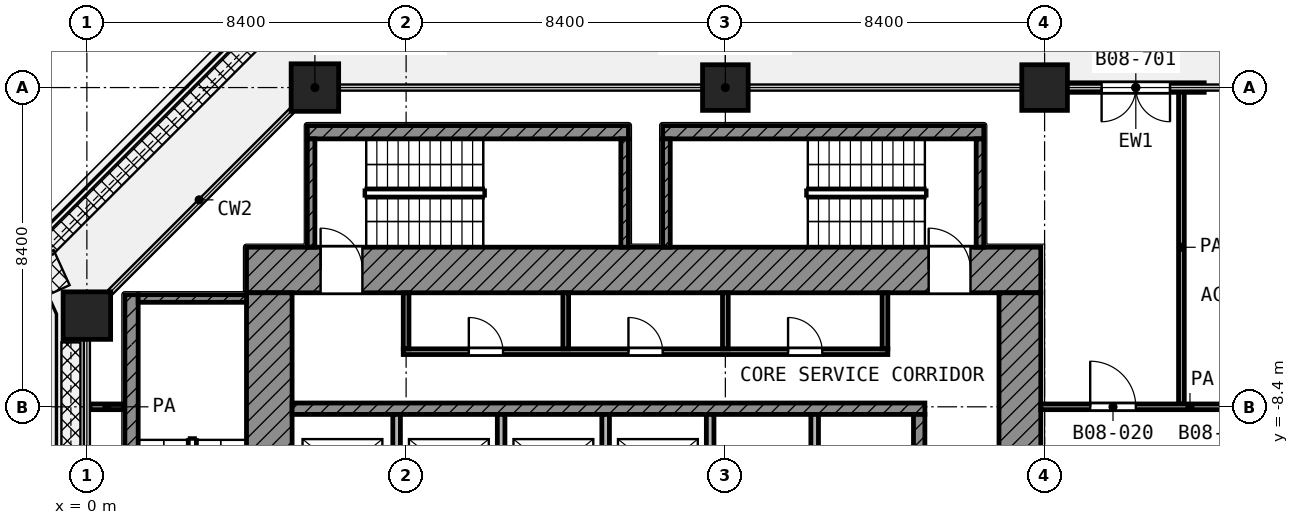
"""IFC4 building model, lengths in metres.
Left out: names, types, materials, properties, quantities, classifications, styles, units other than length and angle.
Written with IfcOpenShell. Run it as: python <this file> out.ifc"""

import sys

from ifc_helpers import new_model, si_unit, direction, frame, frame_2d, origin, origin_2d, place, context, subcontext, project, spatial, rectangle, extrude, element, fill, save


model = new_model("IFC4")
c1 = context("Model", 3, precision=1e-05, world=origin(), true_north=direction((0.0, 1.0)))
c2 = subcontext(c1, "Body", "Model", "MODEL_VIEW")
j1 = project(units=[si_unit("LENGTHUNIT", "METRE"), si_unit("PLANEANGLEUNIT", "RADIAN")], contexts=[c1])
p1 = place(None, origin())
s1 = spatial("IfcSite", under=j1, at=p1, CompositionType="ELEMENT")
p2 = place(p1, origin())
s2 = spatial("IfcBuilding", under=s1, at=p2, CompositionType="ELEMENT")
p3 = place(p2, frame((0.0, 0.0, 39.2)))
s3 = spatial("IfcBuildingStorey", under=s2, at=p3, CompositionType="ELEMENT", Elevation=39.2)
p4 = place(p3, frame((6.0, 0.0, 0.0), z_axis=(0.0, 0.0, 1.0), x_axis=(1.0, 0.0, 0.0)))
e1 = element("IfcColumn", 1, at=p4, inside=s3, PredefinedType="COLUMN", context=c2, shape_type="SweptSolid", body=[
    extrude(rectangle(XDim=1.25, YDim=1.25, at=origin_2d()), origin(), (0.0, 0.0, 1.0), 4.2),
])
for number, where, z_axis, x_axis in (
    (2, (16.8, 0.0, 0.0), (0.0, 0.0, 1.0), (1.0, 0.0, 0.0)),
    (3, (25.2, 0.0, 0.0), (0.0, 0.0, 1.0), (1.0, 0.0, 0.0)),
):
    element("IfcColumn", number, at=place(p3, frame(where, z_axis=z_axis, x_axis=x_axis)), inside=s3, PredefinedType="COLUMN", context=c2, shape_type="SweptSolid", body=[
        extrude(rectangle(XDim=1.2, YDim=1.2, at=origin_2d()), origin(), (0.0, 0.0, 1.0), 4.2),
    ])
p5 = place(p3, frame((0.0, -6.0, 0.0), z_axis=(0.0, 0.0, 1.0), x_axis=(1.0, 0.0, 0.0)))
e4 = element("IfcColumn", 4, at=p5, inside=s3, PredefinedType="COLUMN", context=c2, shape_type="SweptSolid", body=[
    extrude(rectangle(XDim=1.25, YDim=1.25, at=origin_2d()), origin(), (0.0, 0.0, 1.0), 4.2),
])
p6 = place(p3, frame((29.4, 0.0, 0.0), z_axis=(0.0, 0.0, 1.0), x_axis=(-1.0, 0.0, 0.0)))
e5 = element("IfcWall", 5, at=p6, inside=s3, PredefinedType="SOLIDWALL", context=c2, shape_type="SweptSolid", body=[
    extrude(rectangle(XDim=3.6, YDim=0.25, at=frame_2d((1.8, 0.0))), origin(), (0.0, 0.0, 1.0), 3.78),
])
p7 = place(p6, frame((0.9, 0.0, 0.0)))
e6 = element("IfcOpeningElement", 6, at=p7, cuts=e5, PredefinedType="OPENING", context=c2, shape_type="SweptSolid", body=[
    extrude(rectangle(XDim=1.8, YDim=2.1, at=frame_2d((0.9, 1.05))), frame((0.0, 0.135, 0.0), z_axis=(0.0, -1.0, 0.0), x_axis=(1.0, 0.0, 0.0)), (0.0, 0.0, 1.0), 0.27),
])
p8 = place(p3, frame((4.2, -4.8, 0.0), z_axis=(0.0, 0.0, 1.0), x_axis=(1.0, 0.0, 0.0)))
e7 = element("IfcWall", 7, at=p8, inside=s3, PredefinedType="SHEAR", context=c2, shape_type="SweptSolid", body=[
    extrude(rectangle(XDim=20.9, YDim=1.2, at=frame_2d((10.45, 0.0))), origin(), (0.0, 0.0, 1.0), 3.9),
])
p9 = place(p8, frame((1.95, 0.0, 0.0)))
e8 = element("IfcOpeningElement", 8, at=p9, cuts=e7, PredefinedType="OPENING", context=c2, shape_type="SweptSolid", body=[
    extrude(rectangle(XDim=1.1, YDim=2.1, at=frame_2d((0.55, 1.05))), frame((0.0, 0.61, 0.0), z_axis=(0.0, -1.0, 0.0), x_axis=(1.0, 0.0, 0.0)), (0.0, 0.0, 1.0), 1.22),
])
p10 = place(p8, frame((17.95, 0.0, 0.0)))
e9 = element("IfcOpeningElement", 9, at=p10, cuts=e7, PredefinedType="OPENING", context=c2, shape_type="SweptSolid", body=[
    extrude(rectangle(XDim=1.1, YDim=2.1, at=frame_2d((0.55, 1.05))), frame((0.0, 0.61, 0.0), z_axis=(0.0, -1.0, 0.0), x_axis=(1.0, 0.0, 0.0)), (0.0, 0.0, 1.0), 1.22),
])
p11 = place(p3, frame((4.8, -25.1, 0.0), z_axis=(0.0, 0.0, 1.0), x_axis=(0.0, 1.0, 0.0)))
e10 = element("IfcWall", 10, at=p11, inside=s3, PredefinedType="SHEAR", context=c2, shape_type="SweptSolid", body=[
    extrude(rectangle(XDim=19.7, YDim=1.2, at=frame_2d((9.85, 0.0))), origin(), (0.0, 0.0, 1.0), 3.9),
])
p12 = place(p11, frame((11.55, 0.0, 0.0)))
e11 = element("IfcOpeningElement", 11, at=p12, cuts=e10, PredefinedType="OPENING", context=c2, shape_type="SweptSolid", body=[
    extrude(rectangle(XDim=1.1, YDim=2.1, at=frame_2d((0.55, 1.05))), frame((0.0, 0.61, 0.0), z_axis=(0.0, -1.0, 0.0), x_axis=(1.0, 0.0, 0.0)), (0.0, 0.0, 1.0), 1.22),
])
p13 = place(p11, frame((2.25, 0.0, 0.0)))
e12 = element("IfcOpeningElement", 12, at=p13, cuts=e10, PredefinedType="OPENING", context=c2, shape_type="SweptSolid", body=[
    extrude(rectangle(XDim=1.1, YDim=2.1, at=frame_2d((0.55, 1.05))), frame((0.0, 0.61, 0.0), z_axis=(0.0, -1.0, 0.0), x_axis=(1.0, 0.0, 0.0)), (0.0, 0.0, 1.0), 1.22),
])
p14 = place(p3, frame((24.55, -24.0, 0.0), z_axis=(0.0, 0.0, 1.0), x_axis=(0.0, 1.0, 0.0)))
e13 = element("IfcWall", 13, at=p14, inside=s3, PredefinedType="SHEAR", context=c2, shape_type="SweptSolid", body=[
    extrude(rectangle(XDim=18.6, YDim=1.1, at=frame_2d((9.3, 0.0))), origin(), (0.0, 0.0, 1.0), 3.9),
])
p15 = place(p14, frame((10.5, 0.0, 0.0)))
e14 = element("IfcOpeningElement", 14, at=p15, cuts=e13, PredefinedType="OPENING", context=c2, shape_type="SweptSolid", body=[
    extrude(rectangle(XDim=1.8, YDim=2.1, at=frame_2d((0.9, 1.05))), frame((0.0, 0.56, 0.0), z_axis=(0.0, -1.0, 0.0), x_axis=(1.0, 0.0, 0.0)), (0.0, 0.0, 1.0), 1.12),
])
p16 = place(p3, frame((5.4, -8.45, 0.0), z_axis=(0.0, 0.0, 1.0), x_axis=(1.0, 0.0, 0.0)))
e15 = element("IfcWall", 15, at=p16, inside=s3, PredefinedType="SHEAR", context=c2, shape_type="SweptSolid", body=[
    extrude(rectangle(XDim=16.65, YDim=0.3, at=frame_2d((8.325, 0.0))), origin(), (0.0, 0.0, 1.0), 3.9),
])
p17 = place(p3, frame((21.9, -10.95, 0.0), z_axis=(0.0, 0.0, 1.0), x_axis=(0.0, 1.0, 0.0)))
e16 = element("IfcWall", 16, at=p17, inside=s3, PredefinedType="SHEAR", context=c2, shape_type="SweptSolid", body=[
    extrude(rectangle(XDim=2.35, YDim=0.3, at=frame_2d((1.175, 0.0))), origin(), (0.0, 0.0, 1.0), 3.9),
])
for number, where, z_axis, x_axis in (
    (17, (8.15, -10.95, 0.0), (0.0, 0.0, 1.0), (0.0, 1.0, 0.0)),
    (18, (10.9, -10.95, 0.0), (0.0, 0.0, 1.0), (0.0, 1.0, 0.0)),
    (19, (13.65, -10.95, 0.0), (0.0, 0.0, 1.0), (0.0, 1.0, 0.0)),
    (20, (16.4, -10.95, 0.0), (0.0, 0.0, 1.0), (0.0, 1.0, 0.0)),
    (21, (19.15, -10.95, 0.0), (0.0, 0.0, 1.0), (0.0, 1.0, 0.0)),
):
    element("IfcWall", number, at=place(p3, frame(where, z_axis=z_axis, x_axis=x_axis)), inside=s3, PredefinedType="PARTITIONING", context=c2, shape_type="SweptSolid", body=[
        extrude(rectangle(XDim=2.35, YDim=0.2, at=frame_2d((1.175, 0.0))), origin(), (0.0, 0.0, 1.0), 3.9),
    ])
p18 = place(p3, frame((8.325, -6.95, 0.0), z_axis=(0.0, 0.0, 1.0), x_axis=(1.0, 0.0, 0.0)))
e22 = element("IfcWall", 22, at=p18, inside=s3, PredefinedType="PARTITIONING", context=c2, shape_type="SweptSolid", body=[
    extrude(rectangle(XDim=12.75, YDim=0.15, at=frame_2d((6.375, 0.0))), origin(), (0.0, 0.0, 1.0), 3.9),
])
p19 = place(p18, frame((1.725, 0.0, 0.0)))
e23 = element("IfcOpeningElement", 23, at=p19, cuts=e22, PredefinedType="OPENING", context=c2, shape_type="SweptSolid", body=[
    extrude(rectangle(XDim=0.9, YDim=2.1, at=frame_2d((0.45, 1.05))), frame((0.0, 0.085, 0.0), z_axis=(0.0, -1.0, 0.0), x_axis=(1.0, 0.0, 0.0)), (0.0, 0.0, 1.0), 0.17),
])
p20 = place(p18, frame((5.925, 0.0, 0.0)))
e24 = element("IfcOpeningElement", 24, at=p20, cuts=e22, PredefinedType="OPENING", context=c2, shape_type="SweptSolid", body=[
    extrude(rectangle(XDim=0.9, YDim=2.1, at=frame_2d((0.45, 1.05))), frame((0.0, 0.085, 0.0), z_axis=(0.0, -1.0, 0.0), x_axis=(1.0, 0.0, 0.0)), (0.0, 0.0, 1.0), 0.17),
])
p21 = place(p18, frame((10.125, 0.0, 0.0)))
e25 = element("IfcOpeningElement", 25, at=p21, cuts=e22, PredefinedType="OPENING", context=c2, shape_type="SweptSolid", body=[
    extrude(rectangle(XDim=0.9, YDim=2.1, at=frame_2d((0.45, 1.05))), frame((0.0, 0.085, 0.0), z_axis=(0.0, -1.0, 0.0), x_axis=(1.0, 0.0, 0.0)), (0.0, 0.0, 1.0), 0.17),
])
for number, where, z_axis, x_axis in (
    (26, (8.4, -6.875, 0.0), (0.0, 0.0, 1.0), (0.0, 1.0, 0.0)),
    (27, (12.6, -6.875, 0.0), (0.0, 0.0, 1.0), (0.0, 1.0, 0.0)),
    (28, (16.8, -6.875, 0.0), (0.0, 0.0, 1.0), (0.0, 1.0, 0.0)),
    (29, (21.0, -6.875, 0.0), (0.0, 0.0, 1.0), (0.0, 1.0, 0.0)),
):
    element("IfcWall", number, at=place(p3, frame(where, z_axis=z_axis, x_axis=x_axis)), inside=s3, PredefinedType="PARTITIONING", context=c2, shape_type="SweptSolid", body=[
        extrude(rectangle(XDim=1.475, YDim=0.15, at=frame_2d((0.738, 0.0))), origin(), (0.0, 0.0, 1.0), 3.9),
    ])
p22 = place(p3, frame((1.175, -13.9, 0.0), z_axis=(0.0, 0.0, 1.0), x_axis=(0.0, 1.0, 0.0)))
e30 = element("IfcWall", 30, at=p22, inside=s3, PredefinedType="SHEAR", context=c2, shape_type="SweptSolid", body=[
    extrude(rectangle(XDim=8.45, YDim=0.35, at=frame_2d((4.225, 0.0))), origin(), (0.0, 0.0, 1.0), 3.9),
])
p23 = place(p3, frame((1.35, -5.55, 0.0), z_axis=(0.0, 0.0, 1.0), x_axis=(1.0, 0.0, 0.0)))
e31 = element("IfcWall", 31, at=p23, inside=s3, PredefinedType="SHEAR", context=c2, shape_type="SweptSolid", body=[
    extrude(rectangle(XDim=2.85, YDim=0.2, at=frame_2d((1.425, 0.0))), origin(), (0.0, 0.0, 1.0), 3.9),
])
p24 = place(p3, frame((5.8, -1.175, 0.0), z_axis=(0.0, 0.0, 1.0), x_axis=(1.0, 0.0, 0.0)))
e32 = element("IfcWall", 32, at=p24, inside=s3, PredefinedType="SHEAR", context=c2, shape_type="SweptSolid", body=[
    extrude(rectangle(XDim=8.45, YDim=0.35, at=frame_2d((4.225, 0.0))), origin(), (0.0, 0.0, 1.0), 3.9),
])
for number, where, z_axis, x_axis in (
    (33, (5.9, -4.2, 0.0), (0.0, 0.0, 1.0), (0.0, 1.0, 0.0)),
    (34, (14.15, -4.2, 0.0), (0.0, 0.0, 1.0), (0.0, 1.0, 0.0)),
):
    element("IfcWall", number, at=place(p3, frame(where, z_axis=z_axis, x_axis=x_axis)), inside=s3, PredefinedType="SHEAR", context=c2, shape_type="SweptSolid", body=[
        extrude(rectangle(XDim=2.85, YDim=0.2, at=frame_2d((1.425, 0.0))), origin(), (0.0, 0.0, 1.0), 3.9),
    ])
p25 = place(p3, frame((15.15, -1.175, 0.0), z_axis=(0.0, 0.0, 1.0), x_axis=(1.0, 0.0, 0.0)))
e35 = element("IfcWall", 35, at=p25, inside=s3, PredefinedType="SHEAR", context=c2, shape_type="SweptSolid", body=[
    extrude(rectangle(XDim=8.45, YDim=0.35, at=frame_2d((4.225, 0.0))), origin(), (0.0, 0.0, 1.0), 3.9),
])
for number, where, z_axis, x_axis in (
    (36, (15.25, -4.2, 0.0), (0.0, 0.0, 1.0), (0.0, 1.0, 0.0)),
    (37, (23.5, -4.2, 0.0), (0.0, 0.0, 1.0), (0.0, 1.0, 0.0)),
):
    element("IfcWall", number, at=place(p3, frame(where, z_axis=z_axis, x_axis=x_axis)), inside=s3, PredefinedType="SHEAR", context=c2, shape_type="SweptSolid", body=[
        extrude(rectangle(XDim=2.85, YDim=0.2, at=frame_2d((1.425, 0.0))), origin(), (0.0, 0.0, 1.0), 3.9),
    ])
p26 = place(p3, frame((0.08, -8.4, 0.0), z_axis=(0.0, 0.0, 1.0), x_axis=(1.0, 0.0, 0.0)))
e38 = element("IfcWall", 38, at=p26, inside=s3, PredefinedType="PARTITIONING", context=c2, shape_type="SweptSolid", body=[
    extrude(rectangle(XDim=0.89, YDim=0.15, at=frame_2d((0.445, 0.0))), origin(), (0.0, 0.0, 1.0), 3.9),
])
p27 = place(p3, frame((25.1, -8.4, 0.0), z_axis=(0.0, 0.0, 1.0), x_axis=(1.0, 0.0, 0.0)))
e39 = element("IfcWall", 39, at=p27, inside=s3, PredefinedType="PARTITIONING", context=c2, shape_type="SweptSolid", body=[
    extrude(rectangle(XDim=7.85, YDim=0.15, at=frame_2d((3.925, 0.0))), origin(), (0.0, 0.0, 1.0), 3.9),
])
p28 = place(p27, frame((1.3, 0.0, 0.0)))
e40 = element("IfcOpeningElement", 40, at=p28, cuts=e39, PredefinedType="OPENING", context=c2, shape_type="SweptSolid", body=[
    extrude(rectangle(XDim=1.2, YDim=2.1, at=frame_2d((0.6, 1.05))), frame((0.0, 0.085, 0.0), z_axis=(0.0, -1.0, 0.0), x_axis=(1.0, 0.0, 0.0)), (0.0, 0.0, 1.0), 0.17),
])
p29 = place(p27, frame((5.275, 0.0, 0.0)))
e41 = element("IfcOpeningElement", 41, at=p29, cuts=e39, PredefinedType="OPENING", context=c2, shape_type="SweptSolid", body=[
    extrude(rectangle(XDim=1.0, YDim=2.1, at=frame_2d((0.5, 1.05))), frame((0.0, 0.085, 0.0), z_axis=(0.0, -1.0, 0.0), x_axis=(1.0, 0.0, 0.0)), (0.0, 0.0, 1.0), 0.17),
])
p30 = place(p3, frame((28.8, -8.325, 0.0), z_axis=(0.0, 0.0, 1.0), x_axis=(0.0, 1.0, 0.0)))
e42 = element("IfcWall", 42, at=p30, inside=s3, PredefinedType="PARTITIONING", context=c2, shape_type="SweptSolid", body=[
    extrude(rectangle(XDim=8.245, YDim=0.15, at=frame_2d((4.123, 0.0))), origin(), (0.0, 0.0, 1.0), 3.9),
])
p31 = place(p7, origin())
e43 = element("IfcDoor", 43, at=p31, inside=s3, OperationType="DOUBLE_DOOR_SINGLE_SWING", PredefinedType="DOOR", context=c2, shape_type="SweptSolid", body=[
    extrude(rectangle(XDim=1.8, YDim=2.1, at=frame_2d((0.9, 1.05))), frame((0.0, 0.025, 0.0), z_axis=(0.0, -1.0, 0.0), x_axis=(1.0, 0.0, 0.0)), (0.0, 0.0, 1.0), 0.05),
])
fill(e6, e43)
p32 = place(p9, origin())
e44 = element("IfcDoor", 44, at=p32, inside=s3, OperationType="SINGLE_SWING_LEFT", PredefinedType="DOOR", context=c2, shape_type="SweptSolid", body=[
    extrude(rectangle(XDim=1.1, YDim=2.1, at=frame_2d((0.55, 1.05))), frame((0.0, 0.025, 0.0), z_axis=(0.0, -1.0, 0.0), x_axis=(1.0, 0.0, 0.0)), (0.0, 0.0, 1.0), 0.05),
])
fill(e8, e44)
p33 = place(p10, origin())
e45 = element("IfcDoor", 45, at=p33, inside=s3, OperationType="SINGLE_SWING_LEFT", PredefinedType="DOOR", context=c2, shape_type="SweptSolid", body=[
    extrude(rectangle(XDim=1.1, YDim=2.1, at=frame_2d((0.55, 1.05))), frame((0.0, 0.025, 0.0), z_axis=(0.0, -1.0, 0.0), x_axis=(1.0, 0.0, 0.0)), (0.0, 0.0, 1.0), 0.05),
])
fill(e9, e45)
p34 = place(p19, origin())
e46 = element("IfcDoor", 46, at=p34, inside=s3, OperationType="SINGLE_SWING_LEFT", PredefinedType="DOOR", context=c2, shape_type="SweptSolid", body=[
    extrude(rectangle(XDim=0.9, YDim=2.1, at=frame_2d((0.45, 1.05))), frame((0.0, 0.025, 0.0), z_axis=(0.0, -1.0, 0.0), x_axis=(1.0, 0.0, 0.0)), (0.0, 0.0, 1.0), 0.05),
])
fill(e23, e46)
p35 = place(p20, origin())
e47 = element("IfcDoor", 47, at=p35, inside=s3, OperationType="SINGLE_SWING_LEFT", PredefinedType="DOOR", context=c2, shape_type="SweptSolid", body=[
    extrude(rectangle(XDim=0.9, YDim=2.1, at=frame_2d((0.45, 1.05))), frame((0.0, 0.025, 0.0), z_axis=(0.0, -1.0, 0.0), x_axis=(1.0, 0.0, 0.0)), (0.0, 0.0, 1.0), 0.05),
])
fill(e24, e47)
p36 = place(p21, origin())
e48 = element("IfcDoor", 48, at=p36, inside=s3, OperationType="SINGLE_SWING_LEFT", PredefinedType="DOOR", context=c2, shape_type="SweptSolid", body=[
    extrude(rectangle(XDim=0.9, YDim=2.1, at=frame_2d((0.45, 1.05))), frame((0.0, 0.025, 0.0), z_axis=(0.0, -1.0, 0.0), x_axis=(1.0, 0.0, 0.0)), (0.0, 0.0, 1.0), 0.05),
])
fill(e25, e48)
p37 = place(p28, origin())
e49 = element("IfcDoor", 49, at=p37, inside=s3, OperationType="SINGLE_SWING_LEFT", PredefinedType="DOOR", context=c2, shape_type="SweptSolid", body=[
    extrude(rectangle(XDim=1.2, YDim=2.1, at=frame_2d((0.6, 1.05))), frame((0.0, 0.025, 0.0), z_axis=(0.0, -1.0, 0.0), x_axis=(1.0, 0.0, 0.0)), (0.0, 0.0, 1.0), 0.05),
])
fill(e40, e49)
save(model, sys.argv[1])
